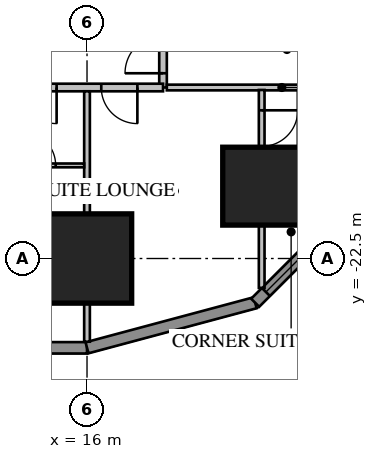
"""IFC4 building model, lengths in metres.
Left out: names, types, materials, properties, quantities, classifications, styles, units other than length and angle.
Written with IfcOpenShell. Run it as: python <this file> out.ifc"""

import sys

from ifc_helpers import new_model, si_unit, direction, frame, frame_2d, origin, origin_2d, place, context, subcontext, project, spatial, rectangle, extrude, element, fill, save


model = new_model("IFC4")
c1 = context("Model", 3, precision=1e-05, world=origin(), true_north=direction((0.0, 1.0)))
c2 = subcontext(c1, "Body", "Model", "MODEL_VIEW")
j1 = project(units=[si_unit("LENGTHUNIT", "METRE"), si_unit("PLANEANGLEUNIT", "RADIAN")], contexts=[c1])
p1 = place(None, origin())
s1 = spatial("IfcSite", under=j1, at=p1, CompositionType="ELEMENT")
p2 = place(p1, origin())
s2 = spatial("IfcBuilding", under=s1, at=p2, CompositionType="ELEMENT")
p3 = place(p2, frame((0.0, 0.0, 39.1)))
s3 = spatial("IfcBuildingStorey", under=s2, at=p3, CompositionType="ELEMENT", Elevation=39.1)
p4 = place(p3, frame((16.0, -22.5, 0.0), z_axis=(0.0, 0.0, 1.0), x_axis=(1.0, 0.0, 0.0)))
e1 = element("IfcColumn", 1, at=p4, inside=s3, PredefinedType="COLUMN", context=c2, shape_type="SweptSolid", body=[
    extrude(rectangle(XDim=2.35, YDim=2.35, at=origin_2d()), origin(), (0.0, 0.0, 1.0), 3.85),
])
p5 = place(p3, frame((20.596, -20.596, 0.0), z_axis=(0.0, 0.0, 1.0), x_axis=(1.0, 0.0, 0.0)))
e2 = element("IfcColumn", 2, at=p5, inside=s3, PredefinedType="COLUMN", context=c2, shape_type="SweptSolid", body=[
    extrude(rectangle(XDim=2.05, YDim=2.05, at=origin_2d()), origin(), (0.0, 0.0, 1.0), 3.85),
])
p6 = place(p3, frame((-16.0, -24.85, 0.0), z_axis=(0.0, 0.0, 1.0), x_axis=(1.0, 0.0, 0.0)))
e3 = element("IfcWall", 3, at=p6, inside=s3, PredefinedType="SOLIDWALL", context=c2, shape_type="SweptSolid", body=[
    extrude(rectangle(XDim=32.0, YDim=0.3, at=frame_2d((16.0, 0.0))), origin(), (0.0, 0.0, 1.0), 3.65),
])
p7 = place(p6, frame((1.2, 0.0, 0.75)))
e4 = element("IfcOpeningElement", 4, at=p7, cuts=e3, PredefinedType="OPENING", context=c2, shape_type="SweptSolid", body=[
    extrude(rectangle(XDim=1.6, YDim=1.8, at=frame_2d((0.8, 0.9))), frame((0.0, 0.17, 0.0), z_axis=(0.0, -1.0, 0.0), x_axis=(1.0, 0.0, 0.0)), (0.0, 0.0, 1.0), 0.34),
])
p8 = place(p6, frame((5.2, 0.0, 0.75)))
e5 = element("IfcOpeningElement", 5, at=p8, cuts=e3, PredefinedType="OPENING", context=c2, shape_type="SweptSolid", body=[
    extrude(rectangle(XDim=1.6, YDim=1.8, at=frame_2d((0.8, 0.9))), frame((0.0, 0.17, 0.0), z_axis=(0.0, -1.0, 0.0), x_axis=(1.0, 0.0, 0.0)), (0.0, 0.0, 1.0), 0.34),
])
p9 = place(p6, frame((17.2, 0.0, 0.75)))
e6 = element("IfcOpeningElement", 6, at=p9, cuts=e3, PredefinedType="OPENING", context=c2, shape_type="SweptSolid", body=[
    extrude(rectangle(XDim=1.6, YDim=1.8, at=frame_2d((0.8, 0.9))), frame((0.0, 0.17, 0.0), z_axis=(0.0, -1.0, 0.0), x_axis=(1.0, 0.0, 0.0)), (0.0, 0.0, 1.0), 0.34),
])
p10 = place(p6, frame((21.2, 0.0, 0.75)))
e7 = element("IfcOpeningElement", 7, at=p10, cuts=e3, PredefinedType="OPENING", context=c2, shape_type="SweptSolid", body=[
    extrude(rectangle(XDim=1.6, YDim=1.8, at=frame_2d((0.8, 0.9))), frame((0.0, 0.17, 0.0), z_axis=(0.0, -1.0, 0.0), x_axis=(1.0, 0.0, 0.0)), (0.0, 0.0, 1.0), 0.34),
])
p11 = place(p6, frame((25.2, 0.0, 0.75)))
e8 = element("IfcOpeningElement", 8, at=p11, cuts=e3, PredefinedType="OPENING", context=c2, shape_type="SweptSolid", body=[
    extrude(rectangle(XDim=1.6, YDim=1.8, at=frame_2d((0.8, 0.9))), frame((0.0, 0.17, 0.0), z_axis=(0.0, -1.0, 0.0), x_axis=(1.0, 0.0, 0.0)), (0.0, 0.0, 1.0), 0.34),
])
p12 = place(p6, frame((29.2, 0.0, 0.75)))
e9 = element("IfcOpeningElement", 9, at=p12, cuts=e3, PredefinedType="OPENING", context=c2, shape_type="SweptSolid", body=[
    extrude(rectangle(XDim=1.6, YDim=1.8, at=frame_2d((0.8, 0.9))), frame((0.0, 0.17, 0.0), z_axis=(0.0, -1.0, 0.0), x_axis=(1.0, 0.0, 0.0)), (0.0, 0.0, 1.0), 0.34),
])
p13 = place(p6, frame((8.8, 0.0, 0.75)))
e10 = element("IfcOpeningElement", 10, at=p13, cuts=e3, PredefinedType="OPENING", context=c2, shape_type="SweptSolid", body=[
    extrude(rectangle(XDim=2.4, YDim=1.8, at=frame_2d((1.2, 0.9))), frame((0.0, 0.17, 0.0), z_axis=(0.0, -1.0, 0.0), x_axis=(1.0, 0.0, 0.0)), (0.0, 0.0, 1.0), 0.34),
])
p14 = place(p6, frame((13.812, 0.0, 0.0)))
e11 = element("IfcOpeningElement", 11, at=p14, cuts=e3, PredefinedType="OPENING", context=c2, shape_type="SweptSolid", body=[
    extrude(rectangle(XDim=1.0, YDim=2.4, at=frame_2d((0.5, 1.2))), frame((0.0, 0.17, 0.0), z_axis=(0.0, -1.0, 0.0), x_axis=(1.0, 0.0, 0.0)), (0.0, 0.0, 1.0), 0.34),
])
p15 = place(p3, frame((16.0, -24.85, 0.0), z_axis=(0.0, 0.0, 1.0), x_axis=(0.965920218567, 0.258839972501, 0.0)))
e12 = element("IfcWall", 12, at=p15, inside=s3, PredefinedType="SOLIDWALL", context=c2, shape_type="SweptSolid", body=[
    extrude(rectangle(XDim=4.581, YDim=0.3, at=frame_2d((2.291, 0.0))), origin(), (0.0, 0.0, 1.0), 3.65),
])
p16 = place(p3, frame((20.425, -23.664, 0.0), z_axis=(0.0, 0.0, 1.0), x_axis=(0.707106781187, 0.707106781187, 0.0)))
e13 = element("IfcWall", 13, at=p16, inside=s3, PredefinedType="SOLIDWALL", context=c2, shape_type="SweptSolid", body=[
    extrude(rectangle(XDim=4.581, YDim=0.3, at=frame_2d((2.291, 0.0))), origin(), (0.0, 0.0, 1.0), 3.65),
])
p17 = place(p16, frame((0.4, 0.0, 0.75)))
e14 = element("IfcOpeningElement", 14, at=p17, cuts=e13, PredefinedType="OPENING", context=c2, shape_type="SweptSolid", body=[
    extrude(rectangle(XDim=3.781, YDim=1.8, at=frame_2d((1.891, 0.9))), frame((0.0, 0.17, 0.0), z_axis=(0.0, -1.0, 0.0), x_axis=(1.0, 0.0, 0.0)), (0.0, 0.0, 1.0), 0.34),
])
p18 = place(p3, frame((18.0, -18.0, 0.0), z_axis=(0.0, 0.0, 1.0), x_axis=(0.0, 1.0, 0.0)))
e15 = element("IfcWall", 15, at=p18, inside=s3, PredefinedType="PARTITIONING", context=c2, shape_type="SweptSolid", body=[
    extrude(rectangle(XDim=36.0, YDim=0.2, at=frame_2d((18.0, 0.0))), origin(), (0.0, 0.0, 1.0), 3.65),
])
p19 = place(p18, frame((10.4, 0.0, 0.0)))
e16 = element("IfcOpeningElement", 16, at=p19, cuts=e15, PredefinedType="OPENING", context=c2, shape_type="SweptSolid", body=[
    extrude(rectangle(XDim=1.0, YDim=2.1, at=frame_2d((0.5, 1.05))), frame((0.0, 0.12, 0.0), z_axis=(0.0, -1.0, 0.0), x_axis=(1.0, 0.0, 0.0)), (0.0, 0.0, 1.0), 0.24),
])
p20 = place(p18, frame((0.375, 0.0, 0.0)))
e17 = element("IfcOpeningElement", 17, at=p20, cuts=e15, PredefinedType="OPENING", context=c2, shape_type="SweptSolid", body=[
    extrude(rectangle(XDim=1.0, YDim=2.1, at=frame_2d((0.5, 1.05))), frame((0.0, 0.12, 0.0), z_axis=(0.0, -1.0, 0.0), x_axis=(1.0, 0.0, 0.0)), (0.0, 0.0, 1.0), 0.24),
])
p21 = place(p18, frame((34.375, 0.0, 0.0)))
e18 = element("IfcOpeningElement", 18, at=p21, cuts=e15, PredefinedType="OPENING", context=c2, shape_type="SweptSolid", body=[
    extrude(rectangle(XDim=0.95, YDim=2.1, at=frame_2d((0.475, 1.05))), frame((0.0, 0.12, 0.0), z_axis=(0.0, -1.0, 0.0), x_axis=(1.0, 0.0, 0.0)), (0.0, 0.0, 1.0), 0.24),
])
p22 = place(p3, frame((18.1, -18.0, 0.0), z_axis=(0.0, 0.0, 1.0), x_axis=(1.0, 0.0, 0.0)))
e19 = element("IfcWall", 19, at=p22, inside=s3, PredefinedType="PARTITIONING", context=c2, shape_type="SweptSolid", body=[
    extrude(rectangle(XDim=6.053, YDim=0.15, at=frame_2d((3.027, 0.0))), origin(), (0.0, 0.0, 1.0), 3.65),
])
p23 = place(p3, frame((-18.0, -18.0, 0.0), z_axis=(0.0, 0.0, 1.0), x_axis=(1.0, 0.0, 0.0)))
e20 = element("IfcWall", 20, at=p23, inside=s3, PredefinedType="PARTITIONING", context=c2, shape_type="SweptSolid", body=[
    extrude(rectangle(XDim=36.0, YDim=0.2, at=frame_2d((18.0, 0.0))), origin(), (0.0, 0.0, 1.0), 3.65),
])
p24 = place(p23, frame((0.375, 0.0, 0.0)))
e21 = element("IfcOpeningElement", 21, at=p24, cuts=e20, PredefinedType="OPENING", context=c2, shape_type="SweptSolid", body=[
    extrude(rectangle(XDim=1.0, YDim=2.1, at=frame_2d((0.5, 1.05))), frame((0.0, 0.12, 0.0), z_axis=(0.0, -1.0, 0.0), x_axis=(1.0, 0.0, 0.0)), (0.0, 0.0, 1.0), 0.24),
])
p25 = place(p23, frame((2.45, 0.0, 0.0)))
e22 = element("IfcOpeningElement", 22, at=p25, cuts=e20, PredefinedType="OPENING", context=c2, shape_type="SweptSolid", body=[
    extrude(rectangle(XDim=0.8, YDim=2.1, at=frame_2d((0.4, 1.05))), frame((0.0, 0.12, 0.0), z_axis=(0.0, -1.0, 0.0), x_axis=(1.0, 0.0, 0.0)), (0.0, 0.0, 1.0), 0.24),
])
p26 = place(p23, frame((4.05, 0.0, 0.0)))
e23 = element("IfcOpeningElement", 23, at=p26, cuts=e20, PredefinedType="OPENING", context=c2, shape_type="SweptSolid", body=[
    extrude(rectangle(XDim=1.0, YDim=2.1, at=frame_2d((0.5, 1.05))), frame((0.0, 0.12, 0.0), z_axis=(0.0, -1.0, 0.0), x_axis=(1.0, 0.0, 0.0)), (0.0, 0.0, 1.0), 0.24),
])
p27 = place(p23, frame((6.45, 0.0, 0.0)))
e24 = element("IfcOpeningElement", 24, at=p27, cuts=e20, PredefinedType="OPENING", context=c2, shape_type="SweptSolid", body=[
    extrude(rectangle(XDim=0.9, YDim=2.1, at=frame_2d((0.45, 1.05))), frame((0.0, 0.12, 0.0), z_axis=(0.0, -1.0, 0.0), x_axis=(1.0, 0.0, 0.0)), (0.0, 0.0, 1.0), 0.24),
])
p28 = place(p23, frame((8.15, 0.0, 0.0)))
e25 = element("IfcOpeningElement", 25, at=p28, cuts=e20, PredefinedType="OPENING", context=c2, shape_type="SweptSolid", body=[
    extrude(rectangle(XDim=1.0, YDim=2.1, at=frame_2d((0.5, 1.05))), frame((0.0, 0.12, 0.0), z_axis=(0.0, -1.0, 0.0), x_axis=(1.0, 0.0, 0.0)), (0.0, 0.0, 1.0), 0.24),
])
p29 = place(p23, frame((18.375, 0.0, 0.0)))
e26 = element("IfcOpeningElement", 26, at=p29, cuts=e20, PredefinedType="OPENING", context=c2, shape_type="SweptSolid", body=[
    extrude(rectangle(XDim=0.95, YDim=2.1, at=frame_2d((0.475, 1.05))), frame((0.0, 0.12, 0.0), z_axis=(0.0, -1.0, 0.0), x_axis=(1.0, 0.0, 0.0)), (0.0, 0.0, 1.0), 0.24),
])
p30 = place(p23, frame((24.25, 0.0, 0.0)))
e27 = element("IfcOpeningElement", 27, at=p30, cuts=e20, PredefinedType="OPENING", context=c2, shape_type="SweptSolid", body=[
    extrude(rectangle(XDim=0.95, YDim=2.1, at=frame_2d((0.475, 1.05))), frame((0.0, 0.12, 0.0), z_axis=(0.0, -1.0, 0.0), x_axis=(1.0, 0.0, 0.0)), (0.0, 0.0, 1.0), 0.24),
])
p31 = place(p23, frame((26.375, 0.0, 0.0)))
e28 = element("IfcOpeningElement", 28, at=p31, cuts=e20, PredefinedType="OPENING", context=c2, shape_type="SweptSolid", body=[
    extrude(rectangle(XDim=0.95, YDim=2.1, at=frame_2d((0.475, 1.05))), frame((0.0, 0.12, 0.0), z_axis=(0.0, -1.0, 0.0), x_axis=(1.0, 0.0, 0.0)), (0.0, 0.0, 1.0), 0.24),
])
p32 = place(p23, frame((32.25, 0.0, 0.0)))
e29 = element("IfcOpeningElement", 29, at=p32, cuts=e20, PredefinedType="OPENING", context=c2, shape_type="SweptSolid", body=[
    extrude(rectangle(XDim=0.95, YDim=2.1, at=frame_2d((0.475, 1.05))), frame((0.0, 0.12, 0.0), z_axis=(0.0, -1.0, 0.0), x_axis=(1.0, 0.0, 0.0)), (0.0, 0.0, 1.0), 0.24),
])
p33 = place(p23, frame((34.375, 0.0, 0.0)))
e30 = element("IfcOpeningElement", 30, at=p33, cuts=e20, PredefinedType="OPENING", context=c2, shape_type="SweptSolid", body=[
    extrude(rectangle(XDim=0.95, YDim=2.1, at=frame_2d((0.475, 1.05))), frame((0.0, 0.12, 0.0), z_axis=(0.0, -1.0, 0.0), x_axis=(1.0, 0.0, 0.0)), (0.0, 0.0, 1.0), 0.24),
])
p34 = place(p23, frame((11.2, 0.0, 0.0)))
e31 = element("IfcOpeningElement", 31, at=p34, cuts=e20, PredefinedType="OPENING", context=c2, shape_type="SweptSolid", body=[
    extrude(rectangle(XDim=1.0, YDim=2.1, at=frame_2d((0.5, 1.05))), frame((0.0, 0.12, 0.0), z_axis=(0.0, -1.0, 0.0), x_axis=(1.0, 0.0, 0.0)), (0.0, 0.0, 1.0), 0.24),
])
p35 = place(p3, frame((16.0, -18.1, 0.0), z_axis=(0.0, 0.0, 1.0), x_axis=(0.0, -1.0, 0.0)))
e32 = element("IfcWall", 32, at=p35, inside=s3, PredefinedType="PARTITIONING", context=c2, shape_type="SweptSolid", body=[
    extrude(rectangle(XDim=6.589, YDim=0.15, at=frame_2d((3.295, 0.0))), origin(), (0.0, 0.0, 1.0), 3.65),
])
p36 = place(p3, frame((20.596, -18.065, 0.0), z_axis=(0.0, 0.0, 1.0), x_axis=(0.0, -1.0, 0.0)))
e33 = element("IfcWall", 33, at=p36, inside=s3, PredefinedType="PARTITIONING", context=c2, shape_type="SweptSolid", body=[
    extrude(rectangle(XDim=5.209, YDim=0.15, at=frame_2d((2.604, 0.0))), origin(), (0.0, 0.0, 1.0), 3.65),
])
p37 = place(p36, frame((0.535, 0.0, 0.0)))
e34 = element("IfcOpeningElement", 34, at=p37, cuts=e33, PredefinedType="OPENING", context=c2, shape_type="SweptSolid", body=[
    extrude(rectangle(XDim=0.95, YDim=2.1, at=frame_2d((0.475, 1.05))), frame((0.0, 0.095, 0.0), z_axis=(0.0, -1.0, 0.0), x_axis=(1.0, 0.0, 0.0)), (0.0, 0.0, 1.0), 0.19),
])
p38 = place(p3, frame((14.075, -20.05, 0.0), z_axis=(0.0, 0.0, 1.0), x_axis=(1.0, 0.0, 0.0)))
e35 = element("IfcWall", 35, at=p38, inside=s3, PredefinedType="PARTITIONING", context=c2, shape_type="SweptSolid", body=[
    extrude(rectangle(XDim=1.85, YDim=0.1, at=frame_2d((0.925, 0.0))), origin(), (0.0, 0.0, 1.0), 3.65),
])
p39 = place(p38, frame((0.2, 0.0, 0.0)))
e36 = element("IfcOpeningElement", 36, at=p39, cuts=e35, PredefinedType="OPENING", context=c2, shape_type="SweptSolid", body=[
    extrude(rectangle(XDim=0.9, YDim=2.1, at=frame_2d((0.45, 1.05))), frame((0.0, 0.07, 0.0), z_axis=(0.0, -1.0, 0.0), x_axis=(1.0, 0.0, 0.0)), (0.0, 0.0, 1.0), 0.14),
])
p40 = place(p17, origin())
e37 = element("IfcWindow", 37, at=p40, inside=s3, PartitioningType="SINGLE_PANEL", PredefinedType="WINDOW", context=c2, shape_type="SweptSolid", body=[
    extrude(rectangle(XDim=3.781, YDim=1.8, at=frame_2d((1.891, 0.9))), frame((0.0, 0.03, 0.0), z_axis=(0.0, -1.0, 0.0), x_axis=(1.0, 0.0, 0.0)), (0.0, 0.0, 1.0), 0.06),
])
fill(e14, e37)
p41 = place(p20, origin())
e38 = element("IfcDoor", 38, at=p41, inside=s3, OperationType="SINGLE_SWING_LEFT", PredefinedType="DOOR", context=c2, shape_type="SweptSolid", body=[
    extrude(rectangle(XDim=1.0, YDim=2.1, at=frame_2d((0.5, 1.05))), frame((0.0, 0.025, 0.0), z_axis=(0.0, -1.0, 0.0), x_axis=(1.0, 0.0, 0.0)), (0.0, 0.0, 1.0), 0.05),
])
fill(e17, e38)
p42 = place(p32, origin())
e39 = element("IfcDoor", 39, at=p42, inside=s3, OperationType="SINGLE_SWING_RIGHT", PredefinedType="DOOR", context=c2, shape_type="SweptSolid", body=[
    extrude(rectangle(XDim=0.95, YDim=2.1, at=frame_2d((0.475, 1.05))), frame((0.0, 0.025, 0.0), z_axis=(0.0, -1.0, 0.0), x_axis=(1.0, 0.0, 0.0)), (0.0, 0.0, 1.0), 0.05),
])
fill(e29, e39)
p43 = place(p33, origin())
e40 = element("IfcDoor", 40, at=p43, inside=s3, OperationType="SINGLE_SWING_RIGHT", PredefinedType="DOOR", context=c2, shape_type="SweptSolid", body=[
    extrude(rectangle(XDim=0.95, YDim=2.1, at=frame_2d((0.475, 1.05))), frame((0.0, 0.025, 0.0), z_axis=(0.0, -1.0, 0.0), x_axis=(1.0, 0.0, 0.0)), (0.0, 0.0, 1.0), 0.05),
])
fill(e30, e40)
p44 = place(p37, origin())
e41 = element("IfcDoor", 41, at=p44, inside=s3, OperationType="SINGLE_SWING_LEFT", PredefinedType="DOOR", context=c2, shape_type="SweptSolid", body=[
    extrude(rectangle(XDim=0.95, YDim=2.1, at=frame_2d((0.475, 1.05))), frame((0.0, 0.025, 0.0), z_axis=(0.0, -1.0, 0.0), x_axis=(1.0, 0.0, 0.0)), (0.0, 0.0, 1.0), 0.05),
])
fill(e34, e41)
p45 = place(p39, origin())
e42 = element("IfcDoor", 42, at=p45, inside=s3, OperationType="SINGLE_SWING_LEFT", PredefinedType="DOOR", context=c2, shape_type="SweptSolid", body=[
    extrude(rectangle(XDim=0.9, YDim=2.1, at=frame_2d((0.45, 1.05))), frame((0.0, 0.025, 0.0), z_axis=(0.0, -1.0, 0.0), x_axis=(1.0, 0.0, 0.0)), (0.0, 0.0, 1.0), 0.05),
])
fill(e36, e42)
save(model, sys.argv[1])
